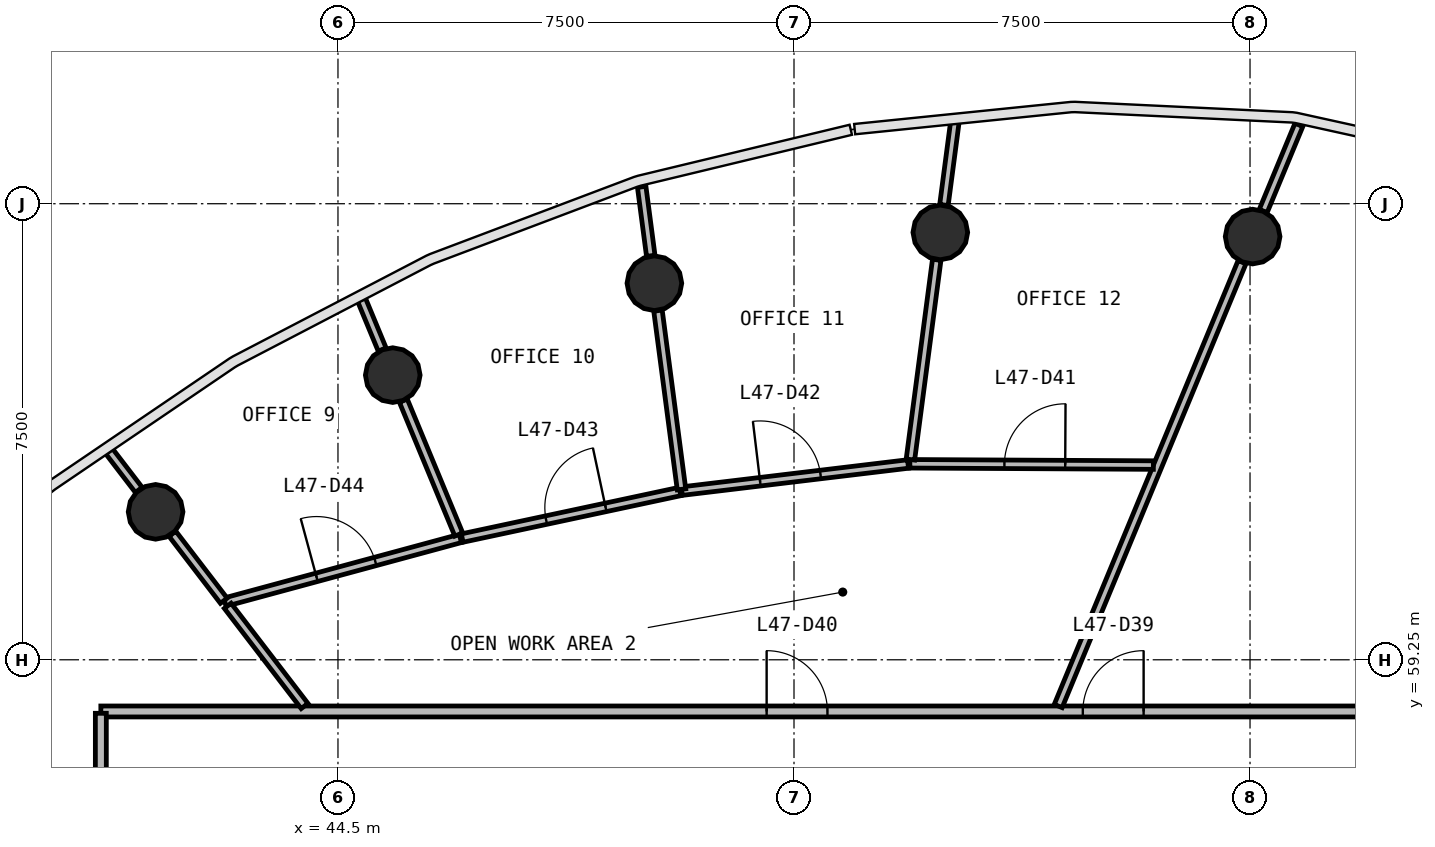
"""IFC4 building model, lengths in metres.
Left out: names, types, materials, properties, quantities, classifications, styles, units other than length and angle.
Written with IfcOpenShell. Run it as: python <this file> out.ifc"""

import sys

from ifc_helpers import new_model, si_unit, direction, frame, frame_2d, origin, origin_2d, place, context, subcontext, project, spatial, rectangle, circle, extrude, source, transform, mapped, element, fill, save


model = new_model("IFC4")
c1 = context("Model", 3, precision=1e-05, world=origin(), true_north=direction((0.0, 1.0)))
c2 = subcontext(c1, "Body", "Model", "MODEL_VIEW")
j1 = project(units=[si_unit("LENGTHUNIT", "METRE"), si_unit("PLANEANGLEUNIT", "RADIAN")], contexts=[c1])
p1 = place(None, origin())
s1 = spatial("IfcSite", under=j1, at=p1, CompositionType="ELEMENT")
p2 = place(p1, origin())
s2 = spatial("IfcBuilding", under=s1, at=p2, CompositionType="ELEMENT")
p3 = place(p2, frame((0.0, 0.0, 195.5)))
s3 = spatial("IfcBuildingStorey", under=s2, at=p3, CompositionType="ELEMENT", Elevation=195.5)
m1 = source(origin(), c2, "Body", "SweptSolid", [
    extrude(circle(Radius=0.45, at=origin_2d()), origin(), (0.0, 0.0, 1.0), 3.9),
])
for number, where, z_axis, x_axis in (
    (1, (59.543, 66.21, 0.0), (0.0, 0.0, 1.0), (1.0, 0.0, 0.0)),
    (2, (54.406, 66.278, 0.0), (0.0, 0.0, 1.0), (1.0, 0.0, 0.0)),
    (3, (49.704, 65.442, 0.0), (0.0, 0.0, 1.0), (1.0, 0.0, 0.0)),
    (4, (45.401, 63.931, 0.0), (0.0, 0.0, 1.0), (1.0, 0.0, 0.0)),
    (5, (41.501, 61.683, 0.0), (0.0, 0.0, 1.0), (1.0, 0.0, 0.0)),
):
    element("IfcColumn", number, at=place(p3, frame(where, z_axis=z_axis, x_axis=x_axis)), inside=s3, PredefinedType="COLUMN", context=c2, shape_type="MappedRepresentation", body=[
        mapped(m1, transform((0.0, 0.0, 0.0), scale=1.0)),
    ])
p4 = place(p3, frame((40.6, 58.4, 0.0), z_axis=(0.0, 0.0, 1.0), x_axis=(1.0, 0.0, 0.0)))
e6 = element("IfcWall", 6, at=p4, inside=s3, PredefinedType="PARTITIONING", context=c2, shape_type="SweptSolid", body=[
    extrude(rectangle(XDim=22.8, YDim=0.18, at=frame_2d((11.4, 0.0))), origin(), (0.0, 0.0, 1.0), 2.88),
])
p5 = place(p4, frame((16.15, 0.0, 0.0)))
e7 = element("IfcOpeningElement", 7, at=p5, cuts=e6, PredefinedType="OPENING", context=c2, shape_type="SweptSolid", body=[
    extrude(rectangle(XDim=1.0, YDim=2.1, at=frame_2d((0.5, 1.05))), frame((0.0, 0.1, 0.0), z_axis=(0.0, -1.0, 0.0), x_axis=(1.0, 0.0, 0.0)), (0.0, 0.0, 1.0), 0.2),
])
p6 = place(p4, frame((10.95, 0.0, 0.0)))
e8 = element("IfcOpeningElement", 8, at=p6, cuts=e6, PredefinedType="OPENING", context=c2, shape_type="SweptSolid", body=[
    extrude(rectangle(XDim=1.0, YDim=2.1, at=frame_2d((0.5, 1.05))), frame((0.0, 0.1, 0.0), z_axis=(0.0, -1.0, 0.0), x_axis=(1.0, 0.0, 0.0)), (0.0, 0.0, 1.0), 0.2),
])
p7 = place(p3, frame((40.6, 37.63, 0.0), z_axis=(0.0, 0.0, 1.0), x_axis=(0.0, 1.0, 0.0)))
e9 = element("IfcWall", 9, at=p7, inside=s3, PredefinedType="PARTITIONING", context=c2, shape_type="SweptSolid", body=[
    extrude(rectangle(XDim=20.74, YDim=0.18, at=frame_2d((10.37, 0.0))), origin(), (0.0, 0.0, 1.0), 2.88),
])
p8 = place(p7, frame((12.19, 0.0, 0.0)))
e10 = element("IfcOpeningElement", 10, at=p8, cuts=e9, PredefinedType="OPENING", context=c2, shape_type="SweptSolid", body=[
    extrude(rectangle(XDim=0.9, YDim=2.1, at=frame_2d((0.45, 1.05))), frame((0.0, 0.1, 0.0), z_axis=(0.0, -1.0, 0.0), x_axis=(1.0, 0.0, 0.0)), (0.0, 0.0, 1.0), 0.2),
])
p9 = place(p7, frame((9.99, 0.0, 0.0)))
e11 = element("IfcOpeningElement", 11, at=p9, cuts=e9, PredefinedType="OPENING", context=c2, shape_type="SweptSolid", body=[
    extrude(rectangle(XDim=0.9, YDim=2.1, at=frame_2d((0.45, 1.05))), frame((0.0, 0.1, 0.0), z_axis=(0.0, -1.0, 0.0), x_axis=(1.0, 0.0, 0.0)), (0.0, 0.0, 1.0), 0.2),
])
p10 = place(p7, frame((7.69, 0.0, 0.0)))
e12 = element("IfcOpeningElement", 12, at=p10, cuts=e9, PredefinedType="OPENING", context=c2, shape_type="SweptSolid", body=[
    extrude(rectangle(XDim=1.0, YDim=2.1, at=frame_2d((0.5, 1.05))), frame((0.0, 0.1, 0.0), z_axis=(0.0, -1.0, 0.0), x_axis=(1.0, 0.0, 0.0)), (0.0, 0.0, 1.0), 0.2),
])
p11 = place(p7, frame((15.49, 0.0, 0.0)))
e13 = element("IfcOpeningElement", 13, at=p11, cuts=e9, PredefinedType="OPENING", context=c2, shape_type="SweptSolid", body=[
    extrude(rectangle(XDim=1.0, YDim=2.1, at=frame_2d((0.5, 1.05))), frame((0.0, 0.1, 0.0), z_axis=(0.0, -1.0, 0.0), x_axis=(1.0, 0.0, 0.0)), (0.0, 0.0, 1.0), 0.2),
])
p12 = place(p3, frame((59.369, 65.789, 0.0), z_axis=(0.0, 0.0, 1.0), x_axis=(-0.382679289053, -0.923881248716, 0.0)))
e14 = element("IfcWall", 14, at=p12, inside=s3, PredefinedType="PARTITIONING", context=c2, shape_type="SweptSolid", body=[
    extrude(rectangle(XDim=7.901, YDim=0.14, at=frame_2d((3.95, 0.0))), origin(), (0.0, 0.0, 1.0), 2.88),
])
p13 = place(p3, frame((53.906, 62.473, 0.0), z_axis=(0.0, 0.0, 1.0), x_axis=(0.999985936292, -0.005303509904, 0.0)))
e15 = element("IfcWall", 15, at=p13, inside=s3, PredefinedType="PARTITIONING", context=c2, shape_type="SweptSolid", body=[
    extrude(rectangle(XDim=4.005, YDim=0.14, at=frame_2d((2.002, 0.0))), origin(), (0.0, 0.0, 1.0), 2.88),
])
p14 = place(p13, frame((1.555, 0.0, 0.0)))
e16 = element("IfcOpeningElement", 16, at=p14, cuts=e15, PredefinedType="OPENING", context=c2, shape_type="SweptSolid", body=[
    extrude(rectangle(XDim=1.0, YDim=2.1, at=frame_2d((0.5, 1.05))), frame((0.0, 0.08, 0.0), z_axis=(0.0, -1.0, 0.0), x_axis=(1.0, 0.0, 0.0)), (0.0, 0.0, 1.0), 0.16),
])
p15 = place(p3, frame((42.641, 60.198, 0.0), z_axis=(0.0, 0.0, 1.0), x_axis=(0.965275935765, 0.261232401957, 0.0)))
e17 = element("IfcWall", 17, at=p15, inside=s3, PredefinedType="PARTITIONING", context=c2, shape_type="SweptSolid", body=[
    extrude(rectangle(XDim=4.012, YDim=0.14, at=frame_2d((2.006, 0.0))), origin(), (0.0, 0.0, 1.0), 2.88),
])
p16 = place(p15, frame((1.562, 0.0, 0.0)))
e18 = element("IfcOpeningElement", 18, at=p16, cuts=e17, PredefinedType="OPENING", context=c2, shape_type="SweptSolid", body=[
    extrude(rectangle(XDim=1.0, YDim=2.1, at=frame_2d((0.5, 1.05))), frame((0.0, 0.08, 0.0), z_axis=(0.0, -1.0, 0.0), x_axis=(1.0, 0.0, 0.0)), (0.0, 0.0, 1.0), 0.16),
])
p17 = place(p3, frame((50.154, 62.023, 0.0), z_axis=(0.0, 0.0, 1.0), x_axis=(0.992895317482, 0.118991127913, 0.0)))
e19 = element("IfcWall", 19, at=p17, inside=s3, PredefinedType="PARTITIONING", context=c2, shape_type="SweptSolid", body=[
    extrude(rectangle(XDim=3.749, YDim=0.14, at=frame_2d((1.874, 0.0))), origin(), (0.0, 0.0, 1.0), 2.88),
])
p18 = place(p17, frame((1.299, 0.0, 0.0)))
e20 = element("IfcOpeningElement", 20, at=p18, cuts=e19, PredefinedType="OPENING", context=c2, shape_type="SweptSolid", body=[
    extrude(rectangle(XDim=1.0, YDim=2.1, at=frame_2d((0.5, 1.05))), frame((0.0, 0.08, 0.0), z_axis=(0.0, -1.0, 0.0), x_axis=(1.0, 0.0, 0.0)), (0.0, 0.0, 1.0), 0.16),
])
p19 = place(p3, frame((46.543, 61.252, 0.0), z_axis=(0.0, 0.0, 1.0), x_axis=(0.977922236045, 0.208969137073, 0.0)))
e21 = element("IfcWall", 21, at=p19, inside=s3, PredefinedType="PARTITIONING", context=c2, shape_type="SweptSolid", body=[
    extrude(rectangle(XDim=3.663, YDim=0.14, at=frame_2d((1.831, 0.0))), origin(), (0.0, 0.0, 1.0), 2.88),
])
p20 = place(p19, frame((1.413, 0.0, 0.0)))
e22 = element("IfcOpeningElement", 22, at=p20, cuts=e21, PredefinedType="OPENING", context=c2, shape_type="SweptSolid", body=[
    extrude(rectangle(XDim=1.0, YDim=2.1, at=frame_2d((0.5, 1.05))), frame((0.0, 0.08, 0.0), z_axis=(0.0, -1.0, 0.0), x_axis=(1.0, 0.0, 0.0)), (0.0, 0.0, 1.0), 0.16),
])
p21 = place(p3, frame((53.915, 62.543, 0.0), z_axis=(0.0, 0.0, 1.0), x_axis=(0.130589863737, 0.99143647678, 0.0)))
e23 = element("IfcWall", 23, at=p21, inside=s3, PredefinedType="PARTITIONING", context=c2, shape_type="SweptSolid", body=[
    extrude(rectangle(XDim=3.313, YDim=0.14, at=frame_2d((1.656, 0.0))), origin(), (0.0, 0.0, 1.0), 2.88),
])
p22 = place(p3, frame((50.15, 62.053, 0.0), z_axis=(0.0, 0.0, 1.0), x_axis=(-0.130539730855, 0.991443078885, 0.0)))
e24 = element("IfcWall", 24, at=p22, inside=s3, PredefinedType="PARTITIONING", context=c2, shape_type="SweptSolid", body=[
    extrude(rectangle(XDim=2.964, YDim=0.14, at=frame_2d((1.482, 0.0))), origin(), (0.0, 0.0, 1.0), 2.88),
])
p23 = place(p3, frame((46.487, 61.311, 0.0), z_axis=(0.0, 0.0, 1.0), x_axis=(-0.38269282806, 0.923875640631, 0.0)))
e25 = element("IfcWall", 25, at=p23, inside=s3, PredefinedType="PARTITIONING", context=c2, shape_type="SweptSolid", body=[
    extrude(rectangle(XDim=2.382, YDim=0.14, at=frame_2d((1.191, 0.0))), origin(), (0.0, 0.0, 1.0), 2.88),
])
p24 = place(p3, frame((43.951, 58.49, 0.0), z_axis=(0.0, 0.0, 1.0), x_axis=(-0.60869315722, 0.793405722411, 0.0)))
e26 = element("IfcWall", 26, at=p24, inside=s3, PredefinedType="PARTITIONING", context=c2, shape_type="SweptSolid", body=[
    extrude(rectangle(XDim=2.076, YDim=0.14, at=frame_2d((1.038, 0.0))), origin(), (0.0, 0.0, 1.0), 2.88),
])
p25 = place(p3, frame((59.717, 66.63, 0.0), z_axis=(0.0, 0.0, 1.0), x_axis=(0.382783039517, 0.923838267587, 0.0)))
e27 = element("IfcWall", 27, at=p25, inside=s3, PredefinedType="PARTITIONING", context=c2, shape_type="SweptSolid", body=[
    extrude(rectangle(XDim=1.533, YDim=0.14, at=frame_2d((0.767, 0.0))), origin(), (0.0, 0.0, 1.0), 2.88),
])
p26 = place(p3, frame((42.622, 60.221, 0.0), z_axis=(0.0, 0.0, 1.0), x_axis=(-0.608715815007, 0.793388339063, 0.0)))
e28 = element("IfcWall", 28, at=p26, inside=s3, PredefinedType="PARTITIONING", context=c2, shape_type="SweptSolid", body=[
    extrude(rectangle(XDim=1.388, YDim=0.14, at=frame_2d((0.694, 0.0))), origin(), (0.0, 0.0, 1.0), 2.88),
])
p27 = place(p3, frame((54.466, 66.729, 0.0), z_axis=(0.0, 0.0, 1.0), x_axis=(0.130495678972, 0.991448878041, 0.0)))
e29 = element("IfcWall", 29, at=p27, inside=s3, PredefinedType="PARTITIONING", context=c2, shape_type="SweptSolid", body=[
    extrude(rectangle(XDim=1.381, YDim=0.14, at=frame_2d((0.69, 0.0))), origin(), (0.0, 0.0, 1.0), 2.88),
])
p28 = place(p3, frame((49.644, 65.893, 0.0), z_axis=(0.0, 0.0, 1.0), x_axis=(-0.130415862512, 0.99145938031, 0.0)))
e30 = element("IfcWall", 30, at=p28, inside=s3, PredefinedType="PARTITIONING", context=c2, shape_type="SweptSolid", body=[
    extrude(rectangle(XDim=1.144, YDim=0.14, at=frame_2d((0.572, 0.0))), origin(), (0.0, 0.0, 1.0), 2.88),
])
p29 = place(p3, frame((45.227, 64.352, 0.0), z_axis=(0.0, 0.0, 1.0), x_axis=(-0.382609993492, 0.923909948469, 0.0)))
e31 = element("IfcWall", 31, at=p29, inside=s3, PredefinedType="PARTITIONING", context=c2, shape_type="SweptSolid", body=[
    extrude(rectangle(XDim=0.891, YDim=0.14, at=frame_2d((0.445, 0.0))), origin(), (0.0, 0.0, 1.0), 2.88),
])
p30 = place(p3, frame((41.224, 62.044, 0.0), z_axis=(0.0, 0.0, 1.0), x_axis=(-0.608783126566, 0.793336690698, 0.0)))
e32 = element("IfcWall", 32, at=p30, inside=s3, PredefinedType="PARTITIONING", context=c2, shape_type="SweptSolid", body=[
    extrude(rectangle(XDim=0.802, YDim=0.14, at=frame_2d((0.401, 0.0))), origin(), (0.0, 0.0, 1.0), 2.88),
])
m2 = source(origin(), c2, "Body", "SweptSolid", [
    extrude(rectangle(XDim=1.0, YDim=2.1, at=frame_2d((0.5, 1.05))), frame((0.0, 0.025, 0.0), z_axis=(0.0, -1.0, 0.0), x_axis=(1.0, 0.0, 0.0)), (0.0, 0.0, 1.0), 0.05),
])
p31 = place(p5, origin())
e33 = element("IfcDoor", 33, at=p31, inside=s3, OperationType="SINGLE_SWING_RIGHT", PredefinedType="DOOR", context=c2, shape_type="MappedRepresentation", body=[
    mapped(m2, transform((0.0, 0.0, 0.0), scale=1.0)),
])
fill(e7, e33)
p32 = place(p6, origin())
e34 = element("IfcDoor", 34, at=p32, inside=s3, OperationType="SINGLE_SWING_LEFT", PredefinedType="DOOR", context=c2, shape_type="MappedRepresentation", body=[
    mapped(m2, transform((0.0, 0.0, 0.0), scale=1.0)),
])
fill(e8, e34)
p33 = place(p14, origin())
e35 = element("IfcDoor", 35, at=p33, inside=s3, OperationType="SINGLE_SWING_RIGHT", PredefinedType="DOOR", context=c2, shape_type="MappedRepresentation", body=[
    mapped(m2, transform((0.0, 0.0, 0.0), scale=1.0)),
])
fill(e16, e35)
p34 = place(p18, origin())
e36 = element("IfcDoor", 36, at=p34, inside=s3, OperationType="SINGLE_SWING_LEFT", PredefinedType="DOOR", context=c2, shape_type="MappedRepresentation", body=[
    mapped(m2, transform((0.0, 0.0, 0.0), scale=1.0)),
])
fill(e20, e36)
p35 = place(p20, origin())
e37 = element("IfcDoor", 37, at=p35, inside=s3, OperationType="SINGLE_SWING_RIGHT", PredefinedType="DOOR", context=c2, shape_type="MappedRepresentation", body=[
    mapped(m2, transform((0.0, 0.0, 0.0), scale=1.0)),
])
fill(e22, e37)
p36 = place(p16, origin())
e38 = element("IfcDoor", 38, at=p36, inside=s3, OperationType="SINGLE_SWING_LEFT", PredefinedType="DOOR", context=c2, shape_type="MappedRepresentation", body=[
    mapped(m2, transform((0.0, 0.0, 0.0), scale=1.0)),
])
fill(e18, e38)
save(model, sys.argv[1])
